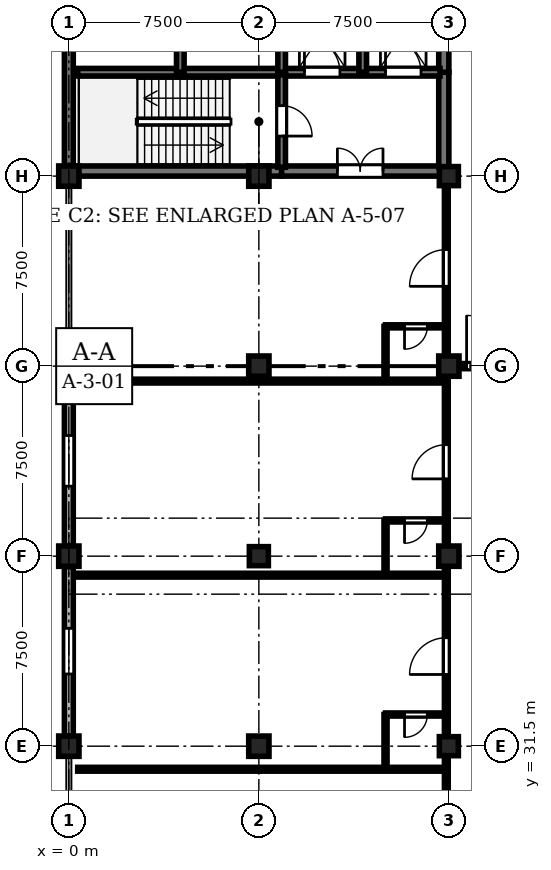
"""IFC4 building model, lengths in metres.
Left out: names, types, materials, properties, quantities, classifications, styles, units other than length and angle.
Written with IfcOpenShell. Run it as: python <this file> out.ifc"""

import sys

from ifc_helpers import new_model, si_unit, direction, frame, frame_2d, origin, origin_2d, place, context, subcontext, project, spatial, rectangle, circle, extrude, element, fill, save


model = new_model("IFC4")
c1 = context("Model", 3, precision=1e-05, world=origin(), true_north=direction((0.0, 1.0)))
c2 = subcontext(c1, "Body", "Model", "MODEL_VIEW")
j1 = project(units=[si_unit("LENGTHUNIT", "METRE"), si_unit("PLANEANGLEUNIT", "RADIAN")], contexts=[c1])
p1 = place(None, origin())
s1 = spatial("IfcSite", under=j1, at=p1, CompositionType="ELEMENT")
p2 = place(p1, origin())
s2 = spatial("IfcBuilding", under=s1, at=p2, CompositionType="ELEMENT")
p3 = place(p2, frame((0.0, 0.0, 9.3)))
s3 = spatial("IfcBuildingStorey", under=s2, at=p3, CompositionType="ELEMENT", Elevation=9.3)
for number, where, z_axis, x_axis in (
    (1, (0.0, 31.5, 0.0), (0.0, 0.0, 1.0), (1.0, 0.0, 0.0)),
    (2, (0.0, 39.0, 0.0), (0.0, 0.0, 1.0), (1.0, 0.0, 0.0)),
):
    element("IfcColumn", number, at=place(p3, frame(where, z_axis=z_axis, x_axis=x_axis)), inside=s3, PredefinedType="COLUMN", context=c2, shape_type="SweptSolid", body=[
        extrude(rectangle(XDim=0.8, YDim=0.8, at=origin_2d()), origin(), (0.0, 0.0, 1.0), 4.8),
    ])
p4 = place(p3, frame((0.0, 46.5, 0.0), z_axis=(0.0, 0.0, 1.0), x_axis=(1.0, 0.0, 0.0)))
e3 = element("IfcColumn", 3, at=p4, inside=s3, PredefinedType="COLUMN", context=c2, shape_type="SweptSolid", body=[
    extrude(circle(Radius=0.375, at=origin_2d()), origin(), (0.0, 0.0, 1.0), 4.8),
])
for number, where, z_axis, x_axis in (
    (4, (0.0, 54.0, 0.0), (0.0, 0.0, 1.0), (1.0, 0.0, 0.0)),
    (5, (7.5, 31.5, 0.0), (0.0, 0.0, 1.0), (1.0, 0.0, 0.0)),
):
    element("IfcColumn", number, at=place(p3, frame(where, z_axis=z_axis, x_axis=x_axis)), inside=s3, PredefinedType="COLUMN", context=c2, shape_type="SweptSolid", body=[
        extrude(rectangle(XDim=0.8, YDim=0.8, at=origin_2d()), origin(), (0.0, 0.0, 1.0), 4.8),
    ])
p5 = place(p3, frame((7.5, 39.0, 0.0), z_axis=(0.0, 0.0, 1.0), x_axis=(1.0, 0.0, 0.0)))
e6 = element("IfcColumn", 6, at=p5, inside=s3, PredefinedType="COLUMN", context=c2, shape_type="SweptSolid", body=[
    extrude(circle(Radius=0.375, at=origin_2d()), origin(), (0.0, 0.0, 1.0), 4.8),
])
for number, where, z_axis, x_axis in (
    (7, (7.5, 46.5, 0.0), (0.0, 0.0, 1.0), (1.0, 0.0, 0.0)),
    (8, (7.5, 54.0, 0.0), (0.0, 0.0, 1.0), (1.0, 0.0, 0.0)),
):
    element("IfcColumn", number, at=place(p3, frame(where, z_axis=z_axis, x_axis=x_axis)), inside=s3, PredefinedType="COLUMN", context=c2, shape_type="SweptSolid", body=[
        extrude(rectangle(XDim=0.8, YDim=0.8, at=origin_2d()), origin(), (0.0, 0.0, 1.0), 4.8),
    ])
p6 = place(p3, frame((15.0, 31.5, 0.0), z_axis=(0.0, 0.0, 1.0), x_axis=(1.0, 0.0, 0.0)))
e9 = element("IfcColumn", 9, at=p6, inside=s3, PredefinedType="COLUMN", context=c2, shape_type="SweptSolid", body=[
    extrude(circle(Radius=0.375, at=origin_2d()), origin(), (0.0, 0.0, 1.0), 4.8),
])
for number, where, z_axis, x_axis in (
    (10, (15.0, 39.0, 0.0), (0.0, 0.0, 1.0), (1.0, 0.0, 0.0)),
    (11, (15.0, 46.5, 0.0), (0.0, 0.0, 1.0), (1.0, 0.0, 0.0)),
):
    element("IfcColumn", number, at=place(p3, frame(where, z_axis=z_axis, x_axis=x_axis)), inside=s3, PredefinedType="COLUMN", context=c2, shape_type="SweptSolid", body=[
        extrude(rectangle(XDim=0.8, YDim=0.8, at=origin_2d()), origin(), (0.0, 0.0, 1.0), 4.8),
    ])
p7 = place(p3, frame((15.0, 54.0, 0.0), z_axis=(0.0, 0.0, 1.0), x_axis=(1.0, 0.0, 0.0)))
e12 = element("IfcColumn", 12, at=p7, inside=s3, PredefinedType="COLUMN", context=c2, shape_type="SweptSolid", body=[
    extrude(circle(Radius=0.375, at=origin_2d()), origin(), (0.0, 0.0, 1.0), 4.8),
])
p8 = place(p3, frame((0.0, 31.91, 0.0), z_axis=(0.0, 0.0, 1.0), x_axis=(0.0, 1.0, 0.0)))
e13 = element("IfcWall", 13, at=p8, inside=s3, PredefinedType="STANDARD", context=c2, shape_type="SweptSolid", body=[
    extrude(rectangle(XDim=6.68, YDim=0.35, at=frame_2d((3.34, 0.0))), origin(), (0.0, 0.0, 1.0), 3.95),
])
p9 = place(p8, frame((2.44, 0.0, 0.9)))
e14 = element("IfcOpeningElement", 14, at=p9, cuts=e13, PredefinedType="OPENING", context=c2, shape_type="SweptSolid", body=[
    extrude(rectangle(XDim=1.8, YDim=1.95, at=frame_2d((0.9, 0.975))), frame((0.0, 0.185, 0.0), z_axis=(0.0, -1.0, 0.0), x_axis=(1.0, 0.0, 0.0)), (0.0, 0.0, 1.0), 0.37),
])
p10 = place(p3, frame((0.0, 39.41, 0.0), z_axis=(0.0, 0.0, 1.0), x_axis=(0.0, 1.0, 0.0)))
e15 = element("IfcWall", 15, at=p10, inside=s3, PredefinedType="STANDARD", context=c2, shape_type="SweptSolid", body=[
    extrude(rectangle(XDim=6.705, YDim=0.35, at=frame_2d((3.353, 0.0))), origin(), (0.0, 0.0, 1.0), 3.95),
])
p11 = place(p10, frame((2.353, 0.0, 0.9)))
e16 = element("IfcOpeningElement", 16, at=p11, cuts=e15, PredefinedType="OPENING", context=c2, shape_type="SweptSolid", body=[
    extrude(rectangle(XDim=2.0, YDim=1.95, at=frame_2d((1.0, 0.975))), frame((0.0, 0.185, 0.0), z_axis=(0.0, -1.0, 0.0), x_axis=(1.0, 0.0, 0.0)), (0.0, 0.0, 1.0), 0.37),
])
p12 = place(p3, frame((0.0, 54.41, 0.0), z_axis=(0.0, 0.0, 1.0), x_axis=(0.0, 1.0, 0.0)))
e17 = element("IfcWall", 17, at=p12, inside=s3, PredefinedType="SHEAR", context=c2, shape_type="SweptSolid", body=[
    extrude(rectangle(XDim=6.68, YDim=0.35, at=frame_2d((3.34, 0.0))), origin(), (0.0, 0.0, 1.0), 4.55),
])
p13 = place(p3, frame((0.35, 54.2, 0.0), z_axis=(0.0, 0.0, 1.0), x_axis=(1.0, 0.0, 0.0)))
e18 = element("IfcWall", 18, at=p13, inside=s3, PredefinedType="SHEAR", context=c2, shape_type="SweptSolid", body=[
    extrude(rectangle(XDim=8.05, YDim=0.4, at=frame_2d((4.025, 0.0))), origin(), (0.0, 0.0, 1.0), 4.55),
])
p14 = place(p3, frame((8.4, 54.2, 0.0), z_axis=(0.0, 0.0, 1.0), x_axis=(1.0, 0.0, 0.0)))
e19 = element("IfcWall", 19, at=p14, inside=s3, PredefinedType="SHEAR", context=c2, shape_type="SweptSolid", body=[
    extrude(rectangle(XDim=6.25, YDim=0.4, at=frame_2d((3.125, 0.0))), origin(), (0.0, 0.0, 1.0), 4.55),
])
p15 = place(p14, frame((2.2, 0.0, 0.0)))
e20 = element("IfcOpeningElement", 20, at=p15, cuts=e19, PredefinedType="OPENING", context=c2, shape_type="SweptSolid", body=[
    extrude(rectangle(XDim=1.8, YDim=2.25, at=frame_2d((0.9, 1.125))), frame((0.0, 0.21, 0.0), z_axis=(0.0, -1.0, 0.0), x_axis=(1.0, 0.0, 0.0)), (0.0, 0.0, 1.0), 0.42),
])
p16 = place(p3, frame((14.8, 54.35, 0.0), z_axis=(0.0, 0.0, 1.0), x_axis=(0.0, 1.0, 0.0)))
e21 = element("IfcWall", 21, at=p16, inside=s3, PredefinedType="SHEAR", context=c2, shape_type="SweptSolid", body=[
    extrude(rectangle(XDim=3.75, YDim=0.4, at=frame_2d((1.875, 0.0))), origin(), (0.0, 0.0, 1.0), 4.55),
])
p17 = place(p3, frame((14.8, 58.1, 0.0), z_axis=(0.0, 0.0, 1.0), x_axis=(0.0, 1.0, 0.0)))
e22 = element("IfcWall", 22, at=p17, inside=s3, PredefinedType="SHEAR", context=c2, shape_type="SweptSolid", body=[
    extrude(rectangle(XDim=3.05, YDim=0.4, at=frame_2d((1.525, 0.0))), origin(), (0.0, 0.0, 1.0), 4.55),
])
p18 = place(p3, frame((0.35, 58.1, 0.0), z_axis=(0.0, 0.0, 1.0), x_axis=(1.0, 0.0, 0.0)))
e23 = element("IfcWall", 23, at=p18, inside=s3, PredefinedType="SHEAR", context=c2, shape_type="SweptSolid", body=[
    extrude(rectangle(XDim=8.05, YDim=0.3, at=frame_2d((4.025, 0.0))), origin(), (0.0, 0.0, 1.0), 4.55),
])
p19 = place(p3, frame((8.4, 58.1, 0.0), z_axis=(0.0, 0.0, 1.0), x_axis=(1.0, 0.0, 0.0)))
e24 = element("IfcWall", 24, at=p19, inside=s3, PredefinedType="SHEAR", context=c2, shape_type="SweptSolid", body=[
    extrude(rectangle(XDim=6.25, YDim=0.3, at=frame_2d((3.125, 0.0))), origin(), (0.0, 0.0, 1.0), 4.55),
])
p20 = place(p19, frame((0.9, 0.0, 0.0)))
e25 = element("IfcOpeningElement", 25, at=p20, cuts=e24, PredefinedType="OPENING", context=c2, shape_type="SweptSolid", body=[
    extrude(rectangle(XDim=1.4, YDim=2.25, at=frame_2d((0.7, 1.125))), frame((0.0, 0.16, 0.0), z_axis=(0.0, -1.0, 0.0), x_axis=(1.0, 0.0, 0.0)), (0.0, 0.0, 1.0), 0.32),
])
p21 = place(p19, frame((4.1, 0.0, 0.0)))
e26 = element("IfcOpeningElement", 26, at=p21, cuts=e24, PredefinedType="OPENING", context=c2, shape_type="SweptSolid", body=[
    extrude(rectangle(XDim=1.4, YDim=2.25, at=frame_2d((0.7, 1.125))), frame((0.0, 0.16, 0.0), z_axis=(0.0, -1.0, 0.0), x_axis=(1.0, 0.0, 0.0)), (0.0, 0.0, 1.0), 0.32),
])
p22 = place(p3, frame((8.4, 58.0, 0.0), z_axis=(0.0, 0.0, 1.0), x_axis=(0.0, -1.0, 0.0)))
e27 = element("IfcWall", 27, at=p22, inside=s3, PredefinedType="SHEAR", context=c2, shape_type="SweptSolid", body=[
    extrude(rectangle(XDim=3.65, YDim=0.3, at=frame_2d((1.825, 0.0))), origin(), (0.0, 0.0, 1.0), 4.55),
])
p23 = place(p22, frame((1.22, 0.0, 0.0)))
e28 = element("IfcOpeningElement", 28, at=p23, cuts=e27, PredefinedType="OPENING", context=c2, shape_type="SweptSolid", body=[
    extrude(rectangle(XDim=1.2, YDim=2.25, at=frame_2d((0.6, 1.125))), frame((0.0, 0.16, 0.0), z_axis=(0.0, -1.0, 0.0), x_axis=(1.0, 0.0, 0.0)), (0.0, 0.0, 1.0), 0.32),
])
for number, where, z_axis, x_axis in (
    (29, (4.4, 58.1, 0.0), (0.0, 0.0, 1.0), (0.0, 1.0, 0.0)),
    (30, (8.4, 58.1, 0.0), (0.0, 0.0, 1.0), (0.0, 1.0, 0.0)),
    (31, (11.6, 58.1, 0.0), (0.0, 0.0, 1.0), (0.0, 1.0, 0.0)),
):
    element("IfcWall", number, at=place(p3, frame(where, z_axis=z_axis, x_axis=x_axis)), inside=s3, PredefinedType="SHEAR", context=c2, shape_type="SweptSolid", body=[
        extrude(rectangle(XDim=3.15, YDim=0.3, at=frame_2d((1.575, 0.0))), origin(), (0.0, 0.0, 1.0), 4.55),
    ])
p24 = place(p3, frame((14.9, 23.09, 0.0), z_axis=(0.0, 0.0, 1.0), x_axis=(0.0, 1.0, 0.0)))
e32 = element("IfcWall", 32, at=p24, inside=s3, PredefinedType="PARTITIONING", context=c2, shape_type="SweptSolid", body=[
    extrude(rectangle(XDim=7.5, YDim=0.15, at=frame_2d((3.75, 0.0))), origin(), (0.0, 0.0, 1.0), 3.835),
])
p25 = place(p24, frame((3.075, 0.0, 0.0)))
e33 = element("IfcOpeningElement", 33, at=p25, cuts=e32, PredefinedType="OPENING", context=c2, shape_type="SweptSolid", body=[
    extrude(rectangle(XDim=1.35, YDim=2.25, at=frame_2d((0.675, 1.125))), frame((0.0, 0.085, 0.0), z_axis=(0.0, -1.0, 0.0), x_axis=(1.0, 0.0, 0.0)), (0.0, 0.0, 1.0), 0.17),
])
p26 = place(p3, frame((14.9, 30.75, 0.0), z_axis=(0.0, 0.0, 1.0), x_axis=(0.0, 1.0, 0.0)))
e34 = element("IfcWall", 34, at=p26, inside=s3, PredefinedType="PARTITIONING", context=c2, shape_type="SweptSolid", body=[
    extrude(rectangle(XDim=7.5, YDim=0.15, at=frame_2d((3.75, 0.0))), origin(), (0.0, 0.0, 1.0), 3.835),
])
p27 = place(p26, frame((3.58, 0.0, 0.0)))
e35 = element("IfcOpeningElement", 35, at=p27, cuts=e34, PredefinedType="OPENING", context=c2, shape_type="SweptSolid", body=[
    extrude(rectangle(XDim=1.45, YDim=2.3, at=frame_2d((0.725, 1.15))), frame((0.0, 0.085, 0.0), z_axis=(0.0, -1.0, 0.0), x_axis=(1.0, 0.0, 0.0)), (0.0, 0.0, 1.0), 0.17),
])
p28 = place(p3, frame((14.9, 32.75, 0.0), z_axis=(0.0, 0.0, 1.0), x_axis=(-1.0, 0.0, 0.0)))
e36 = element("IfcWall", 36, at=p28, inside=s3, PredefinedType="PARTITIONING", context=c2, shape_type="SweptSolid", body=[
    extrude(rectangle(XDim=2.4, YDim=0.12, at=frame_2d((1.2, 0.0))), origin(), (0.0, 0.0, 1.0), 4.535),
])
p29 = place(p28, frame((0.75, 0.0, 0.0)))
e37 = element("IfcOpeningElement", 37, at=p29, cuts=e36, PredefinedType="OPENING", context=c2, shape_type="SweptSolid", body=[
    extrude(rectangle(XDim=0.9, YDim=2.1, at=frame_2d((0.45, 1.05))), frame((0.0, 0.07, 0.0), z_axis=(0.0, -1.0, 0.0), x_axis=(1.0, 0.0, 0.0)), (0.0, 0.0, 1.0), 0.14),
])
p30 = place(p3, frame((12.5, 30.75, 0.0), z_axis=(0.0, 0.0, 1.0), x_axis=(0.0, 1.0, 0.0)))
e38 = element("IfcWall", 38, at=p30, inside=s3, PredefinedType="PARTITIONING", context=c2, shape_type="SweptSolid", body=[
    extrude(rectangle(XDim=2.0, YDim=0.12, at=frame_2d((1.0, 0.0))), origin(), (0.0, 0.0, 1.0), 4.535),
])
p31 = place(p3, frame((14.9, 38.41, 0.0), z_axis=(0.0, 0.0, 1.0), x_axis=(0.0, 1.0, 0.0)))
e39 = element("IfcWall", 39, at=p31, inside=s3, PredefinedType="PARTITIONING", context=c2, shape_type="SweptSolid", body=[
    extrude(rectangle(XDim=7.5, YDim=0.15, at=frame_2d((3.75, 0.0))), origin(), (0.0, 0.0, 1.0), 3.985),
])
p32 = place(p31, frame((3.64, 0.0, 0.0)))
e40 = element("IfcOpeningElement", 40, at=p32, cuts=e39, PredefinedType="OPENING", context=c2, shape_type="SweptSolid", body=[
    extrude(rectangle(XDim=1.35, YDim=2.25, at=frame_2d((0.675, 1.125))), frame((0.0, 0.085, 0.0), z_axis=(0.0, -1.0, 0.0), x_axis=(1.0, 0.0, 0.0)), (0.0, 0.0, 1.0), 0.17),
])
p33 = place(p3, frame((14.9, 40.41, 0.0), z_axis=(0.0, 0.0, 1.0), x_axis=(-1.0, 0.0, 0.0)))
e41 = element("IfcWall", 41, at=p33, inside=s3, PredefinedType="PARTITIONING", context=c2, shape_type="SweptSolid", body=[
    extrude(rectangle(XDim=2.4, YDim=0.12, at=frame_2d((1.2, 0.0))), origin(), (0.0, 0.0, 1.0), 4.535),
])
p34 = place(p33, frame((0.75, 0.0, 0.0)))
e42 = element("IfcOpeningElement", 42, at=p34, cuts=e41, PredefinedType="OPENING", context=c2, shape_type="SweptSolid", body=[
    extrude(rectangle(XDim=0.9, YDim=2.1, at=frame_2d((0.45, 1.05))), frame((0.0, 0.07, 0.0), z_axis=(0.0, -1.0, 0.0), x_axis=(1.0, 0.0, 0.0)), (0.0, 0.0, 1.0), 0.14),
])
p35 = place(p3, frame((12.5, 38.41, 0.0), z_axis=(0.0, 0.0, 1.0), x_axis=(0.0, 1.0, 0.0)))
e43 = element("IfcWall", 43, at=p35, inside=s3, PredefinedType="PARTITIONING", context=c2, shape_type="SweptSolid", body=[
    extrude(rectangle(XDim=2.0, YDim=0.12, at=frame_2d((1.0, 0.0))), origin(), (0.0, 0.0, 1.0), 4.535),
])
p36 = place(p3, frame((14.9, 46.07, 0.0), z_axis=(0.0, 0.0, 1.0), x_axis=(0.0, 1.0, 0.0)))
e44 = element("IfcWall", 44, at=p36, inside=s3, PredefinedType="PARTITIONING", context=c2, shape_type="SweptSolid", body=[
    extrude(rectangle(XDim=7.5, YDim=0.15, at=frame_2d((3.75, 0.0))), origin(), (0.0, 0.0, 1.0), 3.985),
])
p37 = place(p36, frame((3.58, 0.0, 0.0)))
e45 = element("IfcOpeningElement", 45, at=p37, cuts=e44, PredefinedType="OPENING", context=c2, shape_type="SweptSolid", body=[
    extrude(rectangle(XDim=1.45, YDim=2.3, at=frame_2d((0.725, 1.15))), frame((0.0, 0.085, 0.0), z_axis=(0.0, -1.0, 0.0), x_axis=(1.0, 0.0, 0.0)), (0.0, 0.0, 1.0), 0.17),
])
p38 = place(p3, frame((14.9, 48.07, 0.0), z_axis=(0.0, 0.0, 1.0), x_axis=(-1.0, 0.0, 0.0)))
e46 = element("IfcWall", 46, at=p38, inside=s3, PredefinedType="PARTITIONING", context=c2, shape_type="SweptSolid", body=[
    extrude(rectangle(XDim=2.4, YDim=0.12, at=frame_2d((1.2, 0.0))), origin(), (0.0, 0.0, 1.0), 4.535),
])
p39 = place(p38, frame((0.75, 0.0, 0.0)))
e47 = element("IfcOpeningElement", 47, at=p39, cuts=e46, PredefinedType="OPENING", context=c2, shape_type="SweptSolid", body=[
    extrude(rectangle(XDim=0.9, YDim=2.1, at=frame_2d((0.45, 1.05))), frame((0.0, 0.07, 0.0), z_axis=(0.0, -1.0, 0.0), x_axis=(1.0, 0.0, 0.0)), (0.0, 0.0, 1.0), 0.14),
])
p40 = place(p3, frame((12.5, 46.07, 0.0), z_axis=(0.0, 0.0, 1.0), x_axis=(0.0, 1.0, 0.0)))
e48 = element("IfcWall", 48, at=p40, inside=s3, PredefinedType="PARTITIONING", context=c2, shape_type="SweptSolid", body=[
    extrude(rectangle(XDim=2.0, YDim=0.12, at=frame_2d((1.0, 0.0))), origin(), (0.0, 0.0, 1.0), 4.535),
])
for number, where, z_axis, x_axis in (
    (49, (0.35, 30.59, 0.0), (0.0, 0.0, 1.0), (1.0, 0.0, 0.0)),
    (50, (0.35, 38.25, 0.0), (0.0, 0.0, 1.0), (1.0, 0.0, 0.0)),
    (51, (0.35, 45.91, 0.0), (0.0, 0.0, 1.0), (1.0, 0.0, 0.0)),
):
    element("IfcWall", number, at=place(p3, frame(where, z_axis=z_axis, x_axis=x_axis)), inside=s3, PredefinedType="PARTITIONING", context=c2, shape_type="SweptSolid", body=[
        extrude(rectangle(XDim=14.55, YDim=0.15, at=frame_2d((7.275, 0.0))), origin(), (0.0, 0.0, 1.0), 4.535),
    ])
p41 = place(p3, frame((15.2, 46.5, 0.0), z_axis=(0.0, 0.0, 1.0), x_axis=(1.0, 0.0, 0.0)))
e52 = element("IfcWall", 52, at=p41, inside=s3, PredefinedType="STANDARD", context=c2, shape_type="SweptSolid", body=[
    extrude(rectangle(XDim=3.0, YDim=0.2, at=frame_2d((1.5, 0.0))), origin(), (0.0, 0.0, 1.0), 3.985),
])
p42 = place(p41, frame((0.5, 0.0, 0.0)))
e53 = element("IfcOpeningElement", 53, at=p42, cuts=e52, PredefinedType="OPENING", context=c2, shape_type="SweptSolid", body=[
    extrude(rectangle(XDim=2.0, YDim=2.3, at=frame_2d((1.0, 1.15))), frame((0.0, 0.11, 0.0), z_axis=(0.0, -1.0, 0.0), x_axis=(1.0, 0.0, 0.0)), (0.0, 0.0, 1.0), 0.22),
])
p43 = place(p9, origin())
e54 = element("IfcWindow", 54, at=p43, inside=s3, PartitioningType="SINGLE_PANEL", PredefinedType="WINDOW", context=c2, shape_type="SweptSolid", body=[
    extrude(rectangle(XDim=1.8, YDim=1.95, at=frame_2d((0.9, 0.975))), frame((0.0, 0.03, 0.0), z_axis=(0.0, -1.0, 0.0), x_axis=(1.0, 0.0, 0.0)), (0.0, 0.0, 1.0), 0.06),
])
fill(e14, e54)
p44 = place(p11, origin())
e55 = element("IfcWindow", 55, at=p44, inside=s3, PartitioningType="SINGLE_PANEL", PredefinedType="WINDOW", context=c2, shape_type="SweptSolid", body=[
    extrude(rectangle(XDim=2.0, YDim=1.95, at=frame_2d((1.0, 0.975))), frame((0.0, 0.03, 0.0), z_axis=(0.0, -1.0, 0.0), x_axis=(1.0, 0.0, 0.0)), (0.0, 0.0, 1.0), 0.06),
])
fill(e16, e55)
p45 = place(p15, origin())
e56 = element("IfcDoor", 56, at=p45, inside=s3, OperationType="DOUBLE_DOOR_SINGLE_SWING", PredefinedType="DOOR", context=c2, shape_type="SweptSolid", body=[
    extrude(rectangle(XDim=1.8, YDim=2.25, at=frame_2d((0.9, 1.125))), frame((0.0, 0.025, 0.0), z_axis=(0.0, -1.0, 0.0), x_axis=(1.0, 0.0, 0.0)), (0.0, 0.0, 1.0), 0.05),
])
fill(e20, e56)
p46 = place(p20, origin())
e57 = element("IfcDoor", 57, at=p46, inside=s3, OperationType="DOUBLE_DOOR_SLIDING", PredefinedType="DOOR", context=c2, shape_type="SweptSolid", body=[
    extrude(rectangle(XDim=1.4, YDim=2.25, at=frame_2d((0.7, 1.125))), frame((0.0, 0.025, 0.0), z_axis=(0.0, -1.0, 0.0), x_axis=(1.0, 0.0, 0.0)), (0.0, 0.0, 1.0), 0.05),
])
fill(e25, e57)
p47 = place(p21, origin())
e58 = element("IfcDoor", 58, at=p47, inside=s3, OperationType="DOUBLE_DOOR_SLIDING", PredefinedType="DOOR", context=c2, shape_type="SweptSolid", body=[
    extrude(rectangle(XDim=1.4, YDim=2.25, at=frame_2d((0.7, 1.125))), frame((0.0, 0.025, 0.0), z_axis=(0.0, -1.0, 0.0), x_axis=(1.0, 0.0, 0.0)), (0.0, 0.0, 1.0), 0.05),
])
fill(e26, e58)
p48 = place(p23, origin())
e59 = element("IfcDoor", 59, at=p48, inside=s3, OperationType="SINGLE_SWING_RIGHT", PredefinedType="DOOR", context=c2, shape_type="SweptSolid", body=[
    extrude(rectangle(XDim=1.2, YDim=2.25, at=frame_2d((0.6, 1.125))), frame((0.0, 0.025, 0.0), z_axis=(0.0, -1.0, 0.0), x_axis=(1.0, 0.0, 0.0)), (0.0, 0.0, 1.0), 0.05),
])
fill(e28, e59)
p49 = place(p27, origin())
e60 = element("IfcDoor", 60, at=p49, inside=s3, OperationType="SINGLE_SWING_LEFT", PredefinedType="DOOR", context=c2, shape_type="SweptSolid", body=[
    extrude(rectangle(XDim=1.45, YDim=2.3, at=frame_2d((0.725, 1.15))), frame((0.0, 0.025, 0.0), z_axis=(0.0, -1.0, 0.0), x_axis=(1.0, 0.0, 0.0)), (0.0, 0.0, 1.0), 0.05),
])
fill(e35, e60)
p50 = place(p29, origin())
e61 = element("IfcDoor", 61, at=p50, inside=s3, OperationType="SINGLE_SWING_RIGHT", PredefinedType="DOOR", context=c2, shape_type="SweptSolid", body=[
    extrude(rectangle(XDim=0.9, YDim=2.1, at=frame_2d((0.45, 1.05))), frame((0.0, 0.025, 0.0), z_axis=(0.0, -1.0, 0.0), x_axis=(1.0, 0.0, 0.0)), (0.0, 0.0, 1.0), 0.05),
])
fill(e37, e61)
p51 = place(p32, origin())
e62 = element("IfcDoor", 62, at=p51, inside=s3, OperationType="SINGLE_SWING_LEFT", PredefinedType="DOOR", context=c2, shape_type="SweptSolid", body=[
    extrude(rectangle(XDim=1.35, YDim=2.25, at=frame_2d((0.675, 1.125))), frame((0.0, 0.025, 0.0), z_axis=(0.0, -1.0, 0.0), x_axis=(1.0, 0.0, 0.0)), (0.0, 0.0, 1.0), 0.05),
])
fill(e40, e62)
p52 = place(p34, origin())
e63 = element("IfcDoor", 63, at=p52, inside=s3, OperationType="SINGLE_SWING_RIGHT", PredefinedType="DOOR", context=c2, shape_type="SweptSolid", body=[
    extrude(rectangle(XDim=0.9, YDim=2.1, at=frame_2d((0.45, 1.05))), frame((0.0, 0.025, 0.0), z_axis=(0.0, -1.0, 0.0), x_axis=(1.0, 0.0, 0.0)), (0.0, 0.0, 1.0), 0.05),
])
fill(e42, e63)
p53 = place(p37, origin())
e64 = element("IfcDoor", 64, at=p53, inside=s3, OperationType="SINGLE_SWING_LEFT", PredefinedType="DOOR", context=c2, shape_type="SweptSolid", body=[
    extrude(rectangle(XDim=1.45, YDim=2.3, at=frame_2d((0.725, 1.15))), frame((0.0, 0.025, 0.0), z_axis=(0.0, -1.0, 0.0), x_axis=(1.0, 0.0, 0.0)), (0.0, 0.0, 1.0), 0.05),
])
fill(e45, e64)
p54 = place(p39, origin())
e65 = element("IfcDoor", 65, at=p54, inside=s3, OperationType="SINGLE_SWING_RIGHT", PredefinedType="DOOR", context=c2, shape_type="SweptSolid", body=[
    extrude(rectangle(XDim=0.9, YDim=2.1, at=frame_2d((0.45, 1.05))), frame((0.0, 0.025, 0.0), z_axis=(0.0, -1.0, 0.0), x_axis=(1.0, 0.0, 0.0)), (0.0, 0.0, 1.0), 0.05),
])
fill(e47, e65)
p55 = place(p42, origin())
e66 = element("IfcDoor", 66, at=p55, inside=s3, OperationType="DOUBLE_DOOR_SINGLE_SWING", PredefinedType="DOOR", context=c2, shape_type="SweptSolid", body=[
    extrude(rectangle(XDim=2.0, YDim=2.3, at=frame_2d((1.0, 1.15))), frame((0.0, 0.025, 0.0), z_axis=(0.0, -1.0, 0.0), x_axis=(1.0, 0.0, 0.0)), (0.0, 0.0, 1.0), 0.05),
])
fill(e53, e66)
save(model, sys.argv[1])
